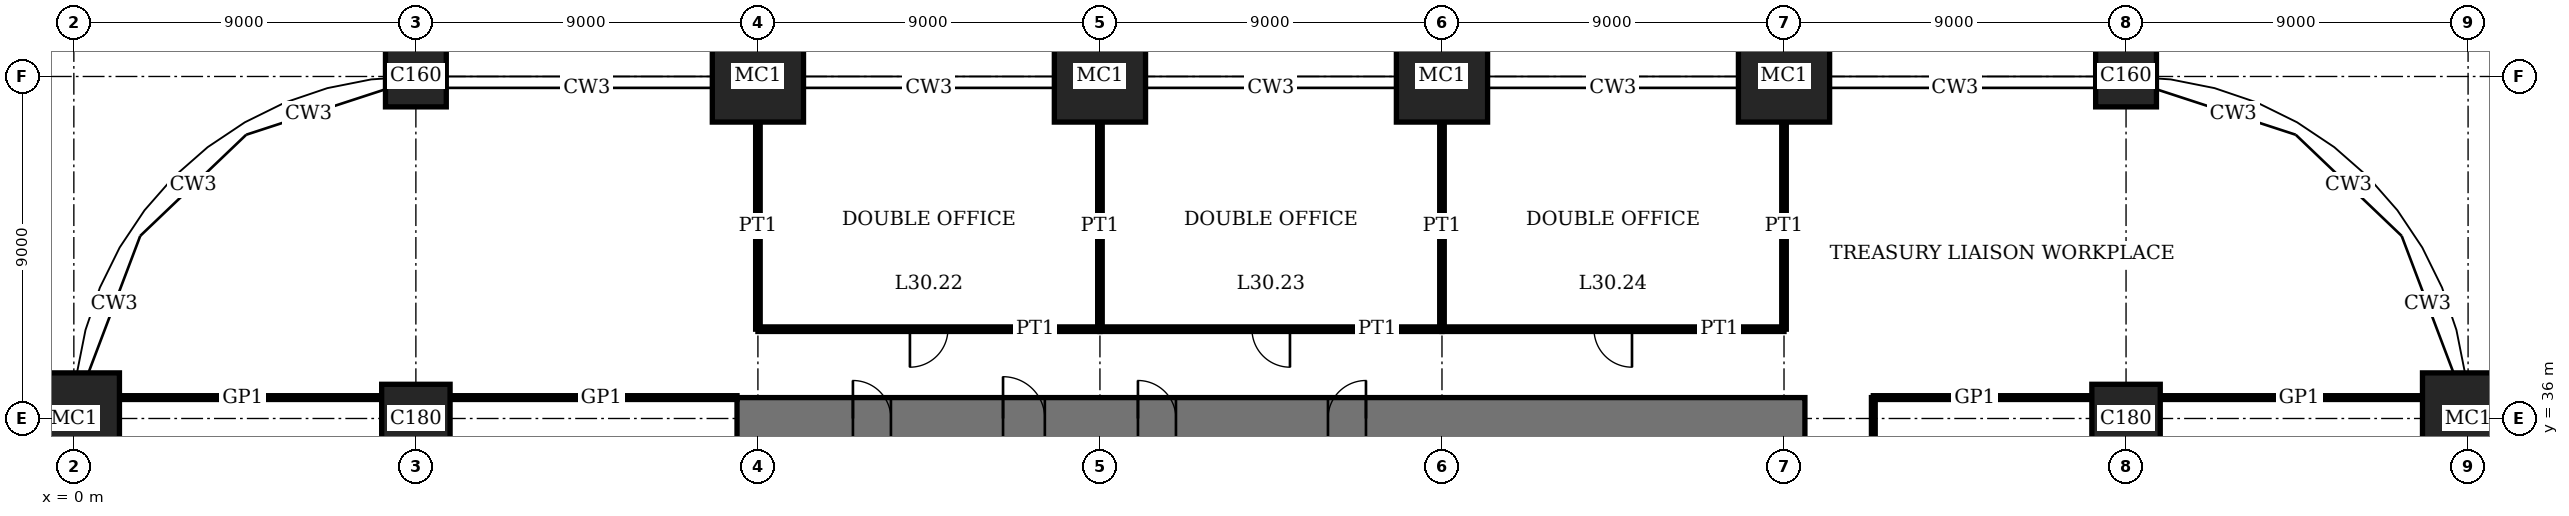
"""IFC4 building model, lengths in metres.
Left out: names, types, materials, properties, quantities, classifications, styles, units other than length and angle.
Written with IfcOpenShell. Run it as: python <this file> out.ifc"""

import sys

from ifc_helpers import new_model, si_unit, direction, frame, frame_2d, origin, origin_2d, place, context, subcontext, project, spatial, rectangle, extrude, element, fill, save


model = new_model("IFC4")
c1 = context("Model", 3, precision=1e-05, world=origin(), true_north=direction((0.0, 1.0)))
c2 = subcontext(c1, "Body", "Model", "MODEL_VIEW")
j1 = project(units=[si_unit("LENGTHUNIT", "METRE"), si_unit("PLANEANGLEUNIT", "RADIAN")], contexts=[c1])
p1 = place(None, origin())
s1 = spatial("IfcSite", under=j1, at=p1, CompositionType="ELEMENT")
p2 = place(p1, origin())
s2 = spatial("IfcBuilding", under=s1, at=p2, CompositionType="ELEMENT")
p3 = place(p2, frame((0.0, 0.0, 125.0)))
s3 = spatial("IfcBuildingStorey", under=s2, at=p3, CompositionType="ELEMENT", Elevation=125.0)
p4 = place(p3, frame((0.0, 36.0, 0.0), z_axis=(0.0, 0.0, 1.0), x_axis=(1.0, 0.0, 0.0)))
e1 = element("IfcColumn", 1, at=p4, inside=s3, PredefinedType="COLUMN", context=c2, shape_type="SweptSolid", body=[
    extrude(rectangle(XDim=2.4, YDim=2.4, at=origin_2d()), origin(), (0.0, 0.0, 1.0), 4.0),
])
p5 = place(p3, frame((9.0, 36.0, 0.0), z_axis=(0.0, 0.0, 1.0), x_axis=(1.0, 0.0, 0.0)))
e2 = element("IfcColumn", 2, at=p5, inside=s3, PredefinedType="COLUMN", context=c2, shape_type="SweptSolid", body=[
    extrude(rectangle(XDim=1.8, YDim=1.8, at=origin_2d()), origin(), (0.0, 0.0, 1.0), 4.0),
])
p6 = place(p3, frame((9.0, 45.0, 0.0), z_axis=(0.0, 0.0, 1.0), x_axis=(1.0, 0.0, 0.0)))
e3 = element("IfcColumn", 3, at=p6, inside=s3, PredefinedType="COLUMN", context=c2, shape_type="SweptSolid", body=[
    extrude(rectangle(XDim=1.6, YDim=1.6, at=origin_2d()), origin(), (0.0, 0.0, 1.0), 4.0),
])
for number, where, z_axis, x_axis in (
    (4, (18.0, 45.0, 0.0), (0.0, 0.0, 1.0), (1.0, 0.0, 0.0)),
    (5, (27.0, 45.0, 0.0), (0.0, 0.0, 1.0), (1.0, 0.0, 0.0)),
    (6, (36.0, 45.0, 0.0), (0.0, 0.0, 1.0), (1.0, 0.0, 0.0)),
    (7, (45.0, 45.0, 0.0), (0.0, 0.0, 1.0), (1.0, 0.0, 0.0)),
):
    element("IfcColumn", number, at=place(p3, frame(where, z_axis=z_axis, x_axis=x_axis)), inside=s3, PredefinedType="COLUMN", context=c2, shape_type="SweptSolid", body=[
        extrude(rectangle(XDim=2.4, YDim=2.4, at=origin_2d()), origin(), (0.0, 0.0, 1.0), 4.0),
    ])
p7 = place(p3, frame((54.0, 36.0, 0.0), z_axis=(0.0, 0.0, 1.0), x_axis=(1.0, 0.0, 0.0)))
e8 = element("IfcColumn", 8, at=p7, inside=s3, PredefinedType="COLUMN", context=c2, shape_type="SweptSolid", body=[
    extrude(rectangle(XDim=1.8, YDim=1.8, at=origin_2d()), origin(), (0.0, 0.0, 1.0), 4.0),
])
p8 = place(p3, frame((54.0, 45.0, 0.0), z_axis=(0.0, 0.0, 1.0), x_axis=(1.0, 0.0, 0.0)))
e9 = element("IfcColumn", 9, at=p8, inside=s3, PredefinedType="COLUMN", context=c2, shape_type="SweptSolid", body=[
    extrude(rectangle(XDim=1.6, YDim=1.6, at=origin_2d()), origin(), (0.0, 0.0, 1.0), 4.0),
])
p9 = place(p3, frame((63.0, 36.0, 0.0), z_axis=(0.0, 0.0, 1.0), x_axis=(1.0, 0.0, 0.0)))
e10 = element("IfcColumn", 10, at=p9, inside=s3, PredefinedType="COLUMN", context=c2, shape_type="SweptSolid", body=[
    extrude(rectangle(XDim=2.4, YDim=2.4, at=origin_2d()), origin(), (0.0, 0.0, 1.0), 4.0),
])
p10 = place(p3, frame((45.55, 36.0, 0.0), z_axis=(0.0, 0.0, 1.0), x_axis=(-1.0, 0.0, 0.0)))
e11 = element("IfcWall", 11, at=p10, inside=s3, PredefinedType="SHEAR", context=c2, shape_type="SweptSolid", body=[
    extrude(rectangle(XDim=28.1, YDim=1.1, at=frame_2d((14.05, 0.0))), origin(), (0.0, 0.0, 1.0), 4.0),
])
p11 = place(p10, frame((11.55, 0.0, 0.0)))
e12 = element("IfcOpeningElement", 12, at=p11, cuts=e11, PredefinedType="OPENING", context=c2, shape_type="SweptSolid", body=[
    extrude(rectangle(XDim=1.0, YDim=2.4, at=frame_2d((0.5, 1.2))), frame((0.0, 0.56, 0.0), z_axis=(0.0, -1.0, 0.0), x_axis=(1.0, 0.0, 0.0)), (0.0, 0.0, 1.0), 1.12),
])
p12 = place(p10, frame((16.55, 0.0, 0.0)))
e13 = element("IfcOpeningElement", 13, at=p12, cuts=e11, PredefinedType="OPENING", context=c2, shape_type="SweptSolid", body=[
    extrude(rectangle(XDim=1.0, YDim=2.4, at=frame_2d((0.5, 1.2))), frame((0.0, 0.56, 0.0), z_axis=(0.0, -1.0, 0.0), x_axis=(1.0, 0.0, 0.0)), (0.0, 0.0, 1.0), 1.12),
])
p13 = place(p10, frame((20.0, 0.0, 0.0)))
e14 = element("IfcOpeningElement", 14, at=p13, cuts=e11, PredefinedType="OPENING", context=c2, shape_type="SweptSolid", body=[
    extrude(rectangle(XDim=1.1, YDim=2.4, at=frame_2d((0.55, 1.2))), frame((0.0, 0.56, 0.0), z_axis=(0.0, -1.0, 0.0), x_axis=(1.0, 0.0, 0.0)), (0.0, 0.0, 1.0), 1.12),
])
p14 = place(p10, frame((24.05, 0.0, 0.0)))
e15 = element("IfcOpeningElement", 15, at=p14, cuts=e11, PredefinedType="OPENING", context=c2, shape_type="SweptSolid", body=[
    extrude(rectangle(XDim=1.0, YDim=2.4, at=frame_2d((0.5, 1.2))), frame((0.0, 0.56, 0.0), z_axis=(0.0, -1.0, 0.0), x_axis=(1.0, 0.0, 0.0)), (0.0, 0.0, 1.0), 1.12),
])
p15 = place(p3, frame((1.2, 36.55, 0.0), z_axis=(0.0, 0.0, 1.0), x_axis=(1.0, 0.0, 0.0)))
e16 = element("IfcWall", 16, at=p15, inside=s3, PredefinedType="PARTITIONING", context=c2, shape_type="SweptSolid", body=[
    extrude(rectangle(XDim=6.9, YDim=0.1, at=frame_2d((3.45, 0.0))), origin(), (0.0, 0.0, 1.0), 3.75),
])
p16 = place(p3, frame((9.9, 36.55, 0.0), z_axis=(0.0, 0.0, 1.0), x_axis=(1.0, 0.0, 0.0)))
e17 = element("IfcWall", 17, at=p16, inside=s3, PredefinedType="PARTITIONING", context=c2, shape_type="SweptSolid", body=[
    extrude(rectangle(XDim=7.55, YDim=0.1, at=frame_2d((3.775, 0.0))), origin(), (0.0, 0.0, 1.0), 3.75),
])
p17 = place(p3, frame((47.35, 36.55, 0.0), z_axis=(0.0, 0.0, 1.0), x_axis=(1.0, 0.0, 0.0)))
e18 = element("IfcWall", 18, at=p17, inside=s3, PredefinedType="PARTITIONING", context=c2, shape_type="SweptSolid", body=[
    extrude(rectangle(XDim=5.75, YDim=0.1, at=frame_2d((2.875, 0.0))), origin(), (0.0, 0.0, 1.0), 3.75),
])
p18 = place(p3, frame((54.9, 36.55, 0.0), z_axis=(0.0, 0.0, 1.0), x_axis=(1.0, 0.0, 0.0)))
e19 = element("IfcWall", 19, at=p18, inside=s3, PredefinedType="PARTITIONING", context=c2, shape_type="SweptSolid", body=[
    extrude(rectangle(XDim=6.9, YDim=0.1, at=frame_2d((3.45, 0.0))), origin(), (0.0, 0.0, 1.0), 3.75),
])
p19 = place(p3, frame((18.0, 38.35, 0.0), z_axis=(0.0, 0.0, 1.0), x_axis=(1.0, 0.0, 0.0)))
e20 = element("IfcWall", 20, at=p19, inside=s3, PredefinedType="PARTITIONING", context=c2, shape_type="SweptSolid", body=[
    extrude(rectangle(XDim=9.0, YDim=0.12, at=frame_2d((4.5, 0.0))), origin(), (0.0, 0.0, 1.0), 3.75),
])
p20 = place(p19, frame((4.0, 0.0, 0.0)))
e21 = element("IfcOpeningElement", 21, at=p20, cuts=e20, PredefinedType="OPENING", context=c2, shape_type="SweptSolid", body=[
    extrude(rectangle(XDim=1.0, YDim=2.4, at=frame_2d((0.5, 1.2))), frame((0.0, 0.07, 0.0), z_axis=(0.0, -1.0, 0.0), x_axis=(1.0, 0.0, 0.0)), (0.0, 0.0, 1.0), 0.14),
])
p21 = place(p3, frame((27.0, 38.35, 0.0), z_axis=(0.0, 0.0, 1.0), x_axis=(1.0, 0.0, 0.0)))
e22 = element("IfcWall", 22, at=p21, inside=s3, PredefinedType="PARTITIONING", context=c2, shape_type="SweptSolid", body=[
    extrude(rectangle(XDim=9.0, YDim=0.12, at=frame_2d((4.5, 0.0))), origin(), (0.0, 0.0, 1.0), 3.75),
])
p22 = place(p21, frame((4.0, 0.0, 0.0)))
e23 = element("IfcOpeningElement", 23, at=p22, cuts=e22, PredefinedType="OPENING", context=c2, shape_type="SweptSolid", body=[
    extrude(rectangle(XDim=1.0, YDim=2.4, at=frame_2d((0.5, 1.2))), frame((0.0, 0.07, 0.0), z_axis=(0.0, -1.0, 0.0), x_axis=(1.0, 0.0, 0.0)), (0.0, 0.0, 1.0), 0.14),
])
p23 = place(p3, frame((36.0, 38.35, 0.0), z_axis=(0.0, 0.0, 1.0), x_axis=(1.0, 0.0, 0.0)))
e24 = element("IfcWall", 24, at=p23, inside=s3, PredefinedType="PARTITIONING", context=c2, shape_type="SweptSolid", body=[
    extrude(rectangle(XDim=9.0, YDim=0.12, at=frame_2d((4.5, 0.0))), origin(), (0.0, 0.0, 1.0), 3.75),
])
p24 = place(p23, frame((4.0, 0.0, 0.0)))
e25 = element("IfcOpeningElement", 25, at=p24, cuts=e24, PredefinedType="OPENING", context=c2, shape_type="SweptSolid", body=[
    extrude(rectangle(XDim=1.0, YDim=2.4, at=frame_2d((0.5, 1.2))), frame((0.0, 0.07, 0.0), z_axis=(0.0, -1.0, 0.0), x_axis=(1.0, 0.0, 0.0)), (0.0, 0.0, 1.0), 0.14),
])
for number, where, z_axis, x_axis in (
    (26, (18.0, 38.35, 0.0), (0.0, 0.0, 1.0), (0.0, 1.0, 0.0)),
    (27, (27.0, 38.35, 0.0), (0.0, 0.0, 1.0), (0.0, 1.0, 0.0)),
    (28, (36.0, 38.35, 0.0), (0.0, 0.0, 1.0), (0.0, 1.0, 0.0)),
    (29, (45.0, 38.35, 0.0), (0.0, 0.0, 1.0), (0.0, 1.0, 0.0)),
):
    element("IfcWall", number, at=place(p3, frame(where, z_axis=z_axis, x_axis=x_axis)), inside=s3, PredefinedType="PARTITIONING", context=c2, shape_type="SweptSolid", body=[
        extrude(rectangle(XDim=5.45, YDim=0.12, at=frame_2d((2.725, 0.0))), origin(), (0.0, 0.0, 1.0), 3.05),
    ])
p25 = place(p3, frame((47.35, 27.0, 0.0), z_axis=(0.0, 0.0, 1.0), x_axis=(0.0, 1.0, 0.0)))
e30 = element("IfcWall", 30, at=p25, inside=s3, PredefinedType="PARTITIONING", context=c2, shape_type="SweptSolid", body=[
    extrude(rectangle(XDim=9.55, YDim=0.1, at=frame_2d((4.775, 0.0))), origin(), (0.0, 0.0, 1.0), 3.75),
])
p26 = place(p25, frame((4.275, 0.0, 0.0)))
e31 = element("IfcOpeningElement", 31, at=p26, cuts=e30, PredefinedType="OPENING", context=c2, shape_type="SweptSolid", body=[
    extrude(rectangle(XDim=1.0, YDim=2.4, at=frame_2d((0.5, 1.2))), frame((0.0, 0.06, 0.0), z_axis=(0.0, -1.0, 0.0), x_axis=(1.0, 0.0, 0.0)), (0.0, 0.0, 1.0), 0.12),
])
p27 = place(p11, origin())
e32 = element("IfcDoor", 32, at=p27, inside=s3, OperationType="SINGLE_SWING_LEFT", PredefinedType="DOOR", context=c2, shape_type="SweptSolid", body=[
    extrude(rectangle(XDim=1.0, YDim=2.4, at=frame_2d((0.5, 1.2))), frame((0.0, 0.025, 0.0), z_axis=(0.0, -1.0, 0.0), x_axis=(1.0, 0.0, 0.0)), (0.0, 0.0, 1.0), 0.05),
    extrude(rectangle(XDim=0.04, YDim=2.4, at=frame_2d((0.02, 1.2))), frame((0.0, 0.4, 0.0), z_axis=(0.0, -1.0, 0.0), x_axis=(1.0, 0.0, 0.0)), (0.0, 0.0, 1.0), 0.8),
    extrude(rectangle(XDim=0.04, YDim=2.4, at=frame_2d((0.98, 1.2))), frame((0.0, 0.4, 0.0), z_axis=(0.0, -1.0, 0.0), x_axis=(1.0, 0.0, 0.0)), (0.0, 0.0, 1.0), 0.8),
    extrude(rectangle(XDim=1.0, YDim=0.04, at=frame_2d((0.5, 2.38))), frame((0.0, 0.4, 0.0), z_axis=(0.0, -1.0, 0.0), x_axis=(1.0, 0.0, 0.0)), (0.0, 0.0, 1.0), 0.8),
])
fill(e12, e32)
p28 = place(p12, origin())
e33 = element("IfcDoor", 33, at=p28, inside=s3, OperationType="SINGLE_SWING_RIGHT", PredefinedType="DOOR", context=c2, shape_type="SweptSolid", body=[
    extrude(rectangle(XDim=1.0, YDim=2.4, at=frame_2d((0.5, 1.2))), frame((0.0, 0.025, 0.0), z_axis=(0.0, -1.0, 0.0), x_axis=(1.0, 0.0, 0.0)), (0.0, 0.0, 1.0), 0.05),
    extrude(rectangle(XDim=0.04, YDim=2.4, at=frame_2d((0.02, 1.2))), frame((0.0, 0.4, 0.0), z_axis=(0.0, -1.0, 0.0), x_axis=(1.0, 0.0, 0.0)), (0.0, 0.0, 1.0), 0.8),
    extrude(rectangle(XDim=0.04, YDim=2.4, at=frame_2d((0.98, 1.2))), frame((0.0, 0.4, 0.0), z_axis=(0.0, -1.0, 0.0), x_axis=(1.0, 0.0, 0.0)), (0.0, 0.0, 1.0), 0.8),
    extrude(rectangle(XDim=1.0, YDim=0.04, at=frame_2d((0.5, 2.38))), frame((0.0, 0.4, 0.0), z_axis=(0.0, -1.0, 0.0), x_axis=(1.0, 0.0, 0.0)), (0.0, 0.0, 1.0), 0.8),
])
fill(e13, e33)
p29 = place(p13, origin())
e34 = element("IfcDoor", 34, at=p29, inside=s3, OperationType="SINGLE_SWING_RIGHT", PredefinedType="DOOR", context=c2, shape_type="SweptSolid", body=[
    extrude(rectangle(XDim=1.1, YDim=2.4, at=frame_2d((0.55, 1.2))), frame((0.0, 0.025, 0.0), z_axis=(0.0, -1.0, 0.0), x_axis=(1.0, 0.0, 0.0)), (0.0, 0.0, 1.0), 0.05),
    extrude(rectangle(XDim=0.04, YDim=2.4, at=frame_2d((0.02, 1.2))), frame((0.0, 0.44, 0.0), z_axis=(0.0, -1.0, 0.0), x_axis=(1.0, 0.0, 0.0)), (0.0, 0.0, 1.0), 0.88),
    extrude(rectangle(XDim=0.04, YDim=2.4, at=frame_2d((1.08, 1.2))), frame((0.0, 0.44, 0.0), z_axis=(0.0, -1.0, 0.0), x_axis=(1.0, 0.0, 0.0)), (0.0, 0.0, 1.0), 0.88),
    extrude(rectangle(XDim=1.1, YDim=0.04, at=frame_2d((0.55, 2.38))), frame((0.0, 0.44, 0.0), z_axis=(0.0, -1.0, 0.0), x_axis=(1.0, 0.0, 0.0)), (0.0, 0.0, 1.0), 0.88),
])
fill(e14, e34)
p30 = place(p14, origin())
e35 = element("IfcDoor", 35, at=p30, inside=s3, OperationType="SINGLE_SWING_RIGHT", PredefinedType="DOOR", context=c2, shape_type="SweptSolid", body=[
    extrude(rectangle(XDim=1.0, YDim=2.4, at=frame_2d((0.5, 1.2))), frame((0.0, 0.025, 0.0), z_axis=(0.0, -1.0, 0.0), x_axis=(1.0, 0.0, 0.0)), (0.0, 0.0, 1.0), 0.05),
    extrude(rectangle(XDim=0.04, YDim=2.4, at=frame_2d((0.02, 1.2))), frame((0.0, 0.4, 0.0), z_axis=(0.0, -1.0, 0.0), x_axis=(1.0, 0.0, 0.0)), (0.0, 0.0, 1.0), 0.8),
    extrude(rectangle(XDim=0.04, YDim=2.4, at=frame_2d((0.98, 1.2))), frame((0.0, 0.4, 0.0), z_axis=(0.0, -1.0, 0.0), x_axis=(1.0, 0.0, 0.0)), (0.0, 0.0, 1.0), 0.8),
    extrude(rectangle(XDim=1.0, YDim=0.04, at=frame_2d((0.5, 2.38))), frame((0.0, 0.4, 0.0), z_axis=(0.0, -1.0, 0.0), x_axis=(1.0, 0.0, 0.0)), (0.0, 0.0, 1.0), 0.8),
])
fill(e15, e35)
p31 = place(p20, origin())
e36 = element("IfcDoor", 36, at=p31, inside=s3, OperationType="SINGLE_SWING_LEFT", PredefinedType="DOOR", context=c2, shape_type="SweptSolid", body=[
    extrude(rectangle(XDim=1.0, YDim=2.4, at=frame_2d((0.5, 1.2))), frame((0.0, 0.025, 0.0), z_axis=(0.0, -1.0, 0.0), x_axis=(1.0, 0.0, 0.0)), (0.0, 0.0, 1.0), 0.05),
])
fill(e21, e36)
p32 = place(p22, origin())
e37 = element("IfcDoor", 37, at=p32, inside=s3, OperationType="SINGLE_SWING_RIGHT", PredefinedType="DOOR", context=c2, shape_type="SweptSolid", body=[
    extrude(rectangle(XDim=1.0, YDim=2.4, at=frame_2d((0.5, 1.2))), frame((0.0, 0.025, 0.0), z_axis=(0.0, -1.0, 0.0), x_axis=(1.0, 0.0, 0.0)), (0.0, 0.0, 1.0), 0.05),
])
fill(e23, e37)
p33 = place(p24, origin())
e38 = element("IfcDoor", 38, at=p33, inside=s3, OperationType="SINGLE_SWING_RIGHT", PredefinedType="DOOR", context=c2, shape_type="SweptSolid", body=[
    extrude(rectangle(XDim=1.0, YDim=2.4, at=frame_2d((0.5, 1.2))), frame((0.0, 0.025, 0.0), z_axis=(0.0, -1.0, 0.0), x_axis=(1.0, 0.0, 0.0)), (0.0, 0.0, 1.0), 0.05),
])
fill(e25, e38)
save(model, sys.argv[1])
